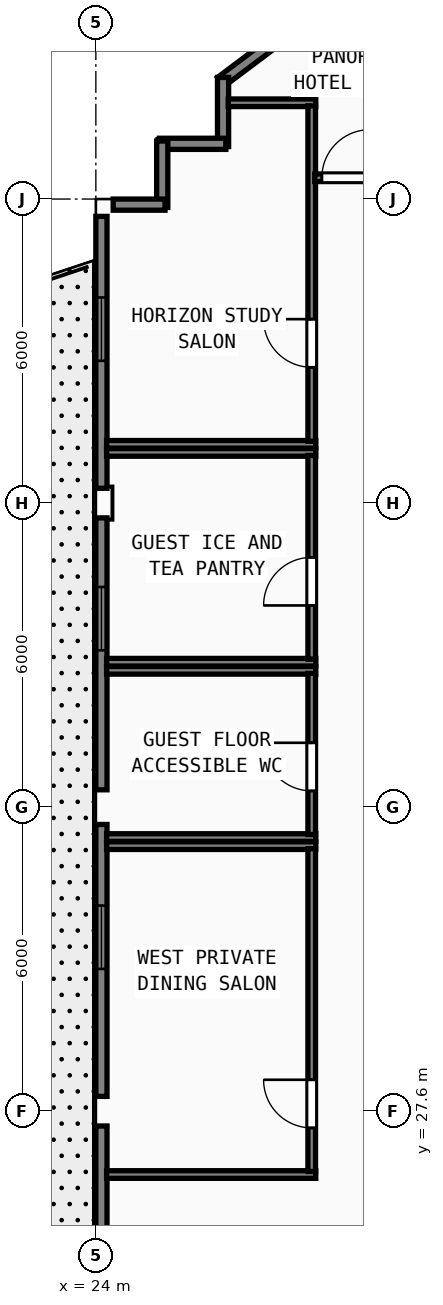
"""IFC4 building model, lengths in metres.
Left out: names, types, materials, properties, quantities, classifications, styles, units other than length and angle.
Written with IfcOpenShell. Run it as: python <this file> out.ifc"""

import sys

from ifc_helpers import new_model, si_unit, direction, frame, frame_2d, origin, origin_2d, place, context, subcontext, project, spatial, rectangle, hollow_rectangle, extrude, element, fill, save


model = new_model("IFC4")
c1 = context("Model", 3, precision=1e-05, world=origin(), true_north=direction((0.0, 1.0)))
c2 = subcontext(c1, "Body", "Model", "MODEL_VIEW")
j1 = project(units=[si_unit("LENGTHUNIT", "METRE"), si_unit("PLANEANGLEUNIT", "RADIAN")], contexts=[c1])
p1 = place(None, origin())
s1 = spatial("IfcSite", under=j1, at=p1, CompositionType="ELEMENT")
p2 = place(p1, origin())
s2 = spatial("IfcBuilding", under=s1, at=p2, CompositionType="ELEMENT")
p3 = place(p2, frame((0.0, 0.0, 282.2)))
s3 = spatial("IfcBuildingStorey", under=s2, at=p3, CompositionType="ELEMENT", Elevation=282.2)
for number, where, z_axis, x_axis in (
    (1, (24.0, 33.6, 0.0), (0.0, 0.0, 1.0), (1.0, 0.0, 0.0)),
    (2, (24.0, 45.6, 0.0), (0.0, 0.0, 1.0), (1.0, 0.0, 0.0)),
):
    element("IfcColumn", number, at=place(p3, frame(where, z_axis=z_axis, x_axis=x_axis)), inside=s3, PredefinedType="COLUMN", context=c2, shape_type="SweptSolid", body=[
        extrude(hollow_rectangle(XDim=0.7, YDim=0.7, WallThickness=0.026, at=origin_2d()), origin(), (0.0, 0.0, 1.0), 3.9),
    ])
for number, where, z_axis, x_axis in (
    (3, (24.0, 27.6, 0.0), (0.0, 0.0, 1.0), (1.0, 0.0, 0.0)),
    (4, (24.0, 39.6, 0.0), (0.0, 0.0, 1.0), (1.0, 0.0, 0.0)),
):
    element("IfcColumn", number, at=place(p3, frame(where, z_axis=z_axis, x_axis=x_axis)), inside=s3, PredefinedType="COLUMN", context=c2, shape_type="SweptSolid", body=[
        extrude(hollow_rectangle(XDim=0.6, YDim=0.6, WallThickness=0.024, at=origin_2d()), origin(), (0.0, 0.0, 1.0), 3.9),
    ])
p4 = place(p3, frame((31.289, 51.529, 0.0), z_axis=(0.0, 0.0, 1.0), x_axis=(-0.800014580093, -0.599980559383, 0.0)))
e5 = element("IfcWall", 5, at=p4, inside=s3, PredefinedType="SOLIDWALL", context=c2, shape_type="SweptSolid", body=[
    extrude(rectangle(XDim=6.028, YDim=0.22, at=frame_2d((3.014, 0.0))), origin(), (0.0, 0.0, 1.0), 3.72),
])
p5 = place(p4, frame((1.6, 0.0, 0.85)))
e6 = element("IfcOpeningElement", 6, at=p5, cuts=e5, PredefinedType="OPENING", context=c2, shape_type="SweptSolid", body=[
    extrude(rectangle(XDim=1.25, YDim=1.95, at=frame_2d((0.625, 0.975))), frame((0.0, 0.12, 0.0), z_axis=(0.0, -1.0, 0.0), x_axis=(1.0, 0.0, 0.0)), (0.0, 0.0, 1.0), 0.24),
])
p6 = place(p3, frame((26.51, 48.0, 0.0), z_axis=(0.0, 0.0, 1.0), x_axis=(0.0, -1.0, 0.0)))
e7 = element("IfcWall", 7, at=p6, inside=s3, PredefinedType="SOLIDWALL", context=c2, shape_type="SweptSolid", body=[
    extrude(rectangle(XDim=1.365, YDim=0.22, at=frame_2d((0.683, 0.0))), origin(), (0.0, 0.0, 1.0), 3.72),
])
for number, where, z_axis, x_axis in (
    (8, (26.565, 46.69, 0.0), (0.0, 0.0, 1.0), (-1.0, 0.0, 0.0)),
    (9, (25.31, 46.745, 0.0), (0.0, 0.0, 1.0), (0.0, -1.0, 0.0)),
):
    element("IfcWall", number, at=place(p3, frame(where, z_axis=z_axis, x_axis=x_axis)), inside=s3, PredefinedType="SOLIDWALL", context=c2, shape_type="SweptSolid", body=[
        extrude(rectangle(XDim=1.31, YDim=0.22, at=frame_2d((0.655, 0.0))), origin(), (0.0, 0.0, 1.0), 3.72),
    ])
p7 = place(p3, frame((25.365, 45.49, 0.0), z_axis=(0.0, 0.0, 1.0), x_axis=(-1.0, 0.0, 0.0)))
e10 = element("IfcWall", 10, at=p7, inside=s3, PredefinedType="SOLIDWALL", context=c2, shape_type="SweptSolid", body=[
    extrude(rectangle(XDim=1.023, YDim=0.22, at=frame_2d((0.511, 0.0))), origin(), (0.0, 0.0, 1.0), 3.72),
])
p8 = place(p3, frame((24.11, 45.258, 0.0), z_axis=(0.0, 0.0, 1.0), x_axis=(0.0, -1.0, 0.0)))
e11 = element("IfcWall", 11, at=p8, inside=s3, PredefinedType="SOLIDWALL", context=c2, shape_type="SweptSolid", body=[
    extrude(rectangle(XDim=5.366, YDim=0.22, at=frame_2d((2.683, 0.0))), origin(), (0.0, 0.0, 1.0), 3.365),
])
p9 = place(p8, frame((1.6, 0.0, 0.85)))
e12 = element("IfcOpeningElement", 12, at=p9, cuts=e11, PredefinedType="OPENING", context=c2, shape_type="SweptSolid", body=[
    extrude(rectangle(XDim=1.25, YDim=1.95, at=frame_2d((0.625, 0.975))), frame((0.0, 0.12, 0.0), z_axis=(0.0, -1.0, 0.0), x_axis=(1.0, 0.0, 0.0)), (0.0, 0.0, 1.0), 0.24),
])
p10 = place(p3, frame((24.11, 39.308, 0.0), z_axis=(0.0, 0.0, 1.0), x_axis=(0.0, -1.0, 0.0)))
e13 = element("IfcWall", 13, at=p10, inside=s3, PredefinedType="SOLIDWALL", context=c2, shape_type="SweptSolid", body=[
    extrude(rectangle(XDim=5.366, YDim=0.22, at=frame_2d((2.683, 0.0))), origin(), (0.0, 0.0, 1.0), 3.365),
])
p11 = place(p10, frame((1.363, 0.0, 0.85)))
e14 = element("IfcOpeningElement", 14, at=p11, cuts=e13, PredefinedType="OPENING", context=c2, shape_type="SweptSolid", body=[
    extrude(rectangle(XDim=1.25, YDim=1.95, at=frame_2d((0.625, 0.975))), frame((0.0, 0.12, 0.0), z_axis=(0.0, -1.0, 0.0), x_axis=(1.0, 0.0, 0.0)), (0.0, 0.0, 1.0), 0.24),
])
p12 = place(p3, frame((24.11, 33.258, 0.0), z_axis=(0.0, 0.0, 1.0), x_axis=(0.0, -1.0, 0.0)))
e15 = element("IfcWall", 15, at=p12, inside=s3, PredefinedType="SOLIDWALL", context=c2, shape_type="SweptSolid", body=[
    extrude(rectangle(XDim=5.366, YDim=0.22, at=frame_2d((2.683, 0.0))), origin(), (0.0, 0.0, 1.0), 3.365),
])
p13 = place(p12, frame((1.6, 0.0, 0.85)))
e16 = element("IfcOpeningElement", 16, at=p13, cuts=e15, PredefinedType="OPENING", context=c2, shape_type="SweptSolid", body=[
    extrude(rectangle(XDim=1.25, YDim=1.95, at=frame_2d((0.625, 0.975))), frame((0.0, 0.12, 0.0), z_axis=(0.0, -1.0, 0.0), x_axis=(1.0, 0.0, 0.0)), (0.0, 0.0, 1.0), 0.24),
])
p14 = place(p3, frame((24.11, 27.308, 0.0), z_axis=(0.0, 0.0, 1.0), x_axis=(0.0, -1.0, 0.0)))
e17 = element("IfcWall", 17, at=p14, inside=s3, PredefinedType="SOLIDWALL", context=c2, shape_type="SweptSolid", body=[
    extrude(rectangle(XDim=5.366, YDim=0.22, at=frame_2d((2.683, 0.0))), origin(), (0.0, 0.0, 1.0), 3.365),
])
p15 = place(p14, frame((5.146, 0.0, 0.0), z_axis=(0.0, 0.0, 1.0), x_axis=(-1.0, 0.0, 0.0)))
e18 = element("IfcOpeningElement", 18, at=p15, cuts=e17, PredefinedType="OPENING", context=c2, shape_type="SweptSolid", body=[
    extrude(rectangle(XDim=1.5, YDim=2.2, at=frame_2d((0.75, 1.1))), frame((0.0, 0.12, 0.0), z_axis=(0.0, -1.0, 0.0), x_axis=(1.0, 0.0, 0.0)), (0.0, 0.0, 1.0), 0.24),
])
for number, where, z_axis, x_axis in (
    (19, (24.212, 36.3, 0.0), (0.0, 0.0, 1.0), (1.0, 0.0, 0.0)),
    (20, (24.212, 33.0, 0.0), (0.0, 0.0, 1.0), (1.0, 0.0, 0.0)),
):
    element("IfcWall", number, at=place(p3, frame(where, z_axis=z_axis, x_axis=x_axis)), inside=s3, PredefinedType="PARTITIONING", context=c2, shape_type="SweptSolid", body=[
        extrude(rectangle(XDim=4.128, YDim=0.15, at=frame_2d((2.064, 0.0))), origin(), (0.0, 0.0, 1.0), 3.72),
    ])
p16 = place(p3, frame((28.26, 33.06, 0.0), z_axis=(0.0, 0.0, 1.0), x_axis=(0.0, 1.0, 0.0)))
e21 = element("IfcWall", 21, at=p16, inside=s3, PredefinedType="PARTITIONING", context=c2, shape_type="SweptSolid", body=[
    extrude(rectangle(XDim=3.18, YDim=0.15, at=frame_2d((1.59, 0.0))), origin(), (0.0, 0.0, 1.0), 3.72),
])
p17 = place(p16, frame((1.81, 0.0, 0.0), z_axis=(0.0, 0.0, 1.0), x_axis=(-1.0, 0.0, 0.0)))
e22 = element("IfcOpeningElement", 22, at=p17, cuts=e21, PredefinedType="OPENING", context=c2, shape_type="SweptSolid", body=[
    extrude(rectangle(XDim=0.95, YDim=2.12, at=frame_2d((0.475, 1.06))), frame((0.0, 0.085, 0.0), z_axis=(0.0, -1.0, 0.0), x_axis=(1.0, 0.0, 0.0)), (0.0, 0.0, 1.0), 0.17),
])
for number, where, z_axis, x_axis in (
    (23, (24.212, 40.6, 0.0), (0.0, 0.0, 1.0), (1.0, 0.0, 0.0)),
    (24, (24.212, 36.46, 0.0), (0.0, 0.0, 1.0), (1.0, 0.0, 0.0)),
):
    element("IfcWall", number, at=place(p3, frame(where, z_axis=z_axis, x_axis=x_axis)), inside=s3, PredefinedType="PARTITIONING", context=c2, shape_type="SweptSolid", body=[
        extrude(rectangle(XDim=4.128, YDim=0.15, at=frame_2d((2.064, 0.0))), origin(), (0.0, 0.0, 1.0), 3.72),
    ])
p18 = place(p3, frame((28.26, 36.52, 0.0), z_axis=(0.0, 0.0, 1.0), x_axis=(0.0, 1.0, 0.0)))
e25 = element("IfcWall", 25, at=p18, inside=s3, PredefinedType="PARTITIONING", context=c2, shape_type="SweptSolid", body=[
    extrude(rectangle(XDim=4.02, YDim=0.15, at=frame_2d((2.01, 0.0))), origin(), (0.0, 0.0, 1.0), 3.72),
])
p19 = place(p18, frame((2.01, 0.0, 0.0), z_axis=(0.0, 0.0, 1.0), x_axis=(-1.0, 0.0, 0.0)))
e26 = element("IfcOpeningElement", 26, at=p19, cuts=e25, PredefinedType="OPENING", context=c2, shape_type="SweptSolid", body=[
    extrude(rectangle(XDim=0.95, YDim=2.12, at=frame_2d((0.475, 1.06))), frame((0.0, 0.085, 0.0), z_axis=(0.0, -1.0, 0.0), x_axis=(1.0, 0.0, 0.0)), (0.0, 0.0, 1.0), 0.17),
])
p20 = place(p3, frame((26.612, 47.5, 0.0), z_axis=(0.0, 0.0, 1.0), x_axis=(1.0, 0.0, 0.0)))
e27 = element("IfcWall", 27, at=p20, inside=s3, PredefinedType="PARTITIONING", context=c2, shape_type="SweptSolid", body=[
    extrude(rectangle(XDim=1.728, YDim=0.15, at=frame_2d((0.864, 0.0))), origin(), (0.0, 0.0, 1.0), 3.72),
])
p21 = place(p3, frame((24.212, 40.76, 0.0), z_axis=(0.0, 0.0, 1.0), x_axis=(1.0, 0.0, 0.0)))
e28 = element("IfcWall", 28, at=p21, inside=s3, PredefinedType="PARTITIONING", context=c2, shape_type="SweptSolid", body=[
    extrude(rectangle(XDim=4.128, YDim=0.15, at=frame_2d((2.064, 0.0))), origin(), (0.0, 0.0, 1.0), 3.72),
])
p22 = place(p3, frame((28.26, 40.82, 0.0), z_axis=(0.0, 0.0, 1.0), x_axis=(0.0, 1.0, 0.0)))
e29 = element("IfcWall", 29, at=p22, inside=s3, PredefinedType="PARTITIONING", context=c2, shape_type="SweptSolid", body=[
    extrude(rectangle(XDim=6.62, YDim=0.15, at=frame_2d((3.31, 0.0))), origin(), (0.0, 0.0, 1.0), 3.72),
])
p23 = place(p22, frame((2.41, 0.0, 0.0), z_axis=(0.0, 0.0, 1.0), x_axis=(-1.0, 0.0, 0.0)))
e30 = element("IfcOpeningElement", 30, at=p23, cuts=e29, PredefinedType="OPENING", context=c2, shape_type="SweptSolid", body=[
    extrude(rectangle(XDim=0.95, YDim=2.12, at=frame_2d((0.475, 1.06))), frame((0.0, 0.085, 0.0), z_axis=(0.0, -1.0, 0.0), x_axis=(1.0, 0.0, 0.0)), (0.0, 0.0, 1.0), 0.17),
])
for number, where, z_axis, x_axis in (
    (31, (24.212, 32.84, 0.0), (0.0, 0.0, 1.0), (1.0, 0.0, 0.0)),
    (32, (24.212, 26.35, 0.0), (0.0, 0.0, 1.0), (1.0, 0.0, 0.0)),
):
    element("IfcWall", number, at=place(p3, frame(where, z_axis=z_axis, x_axis=x_axis)), inside=s3, PredefinedType="PARTITIONING", context=c2, shape_type="SweptSolid", body=[
        extrude(rectangle(XDim=4.128, YDim=0.15, at=frame_2d((2.064, 0.0))), origin(), (0.0, 0.0, 1.0), 3.72),
    ])
p24 = place(p3, frame((28.26, 26.41, 0.0), z_axis=(0.0, 0.0, 1.0), x_axis=(0.0, 1.0, 0.0)))
e33 = element("IfcWall", 33, at=p24, inside=s3, PredefinedType="PARTITIONING", context=c2, shape_type="SweptSolid", body=[
    extrude(rectangle(XDim=6.37, YDim=0.15, at=frame_2d((3.185, 0.0))), origin(), (0.0, 0.0, 1.0), 3.72),
])
p25 = place(p24, frame((1.81, 0.0, 0.0), z_axis=(0.0, 0.0, 1.0), x_axis=(-1.0, 0.0, 0.0)))
e34 = element("IfcOpeningElement", 34, at=p25, cuts=e33, PredefinedType="OPENING", context=c2, shape_type="SweptSolid", body=[
    extrude(rectangle(XDim=0.95, YDim=2.12, at=frame_2d((0.475, 1.06))), frame((0.0, 0.085, 0.0), z_axis=(0.0, -1.0, 0.0), x_axis=(1.0, 0.0, 0.0)), (0.0, 0.0, 1.0), 0.17),
])
p26 = place(p3, frame((28.32, 46.02, 0.0), z_axis=(0.0, 0.0, 1.0), x_axis=(1.0, 0.0, 0.0)))
e35 = element("IfcWall", 35, at=p26, inside=s3, PredefinedType="PARTITIONING", context=c2, shape_type="SweptSolid", body=[
    extrude(rectangle(XDim=3.095, YDim=0.15, at=frame_2d((1.547, 0.0))), origin(), (0.0, 0.0, 1.0), 3.72),
])
p27 = place(p26, frame((0.14, 0.0, 0.0)))
e36 = element("IfcOpeningElement", 36, at=p27, cuts=e35, PredefinedType="OPENING", context=c2, shape_type="SweptSolid", body=[
    extrude(rectangle(XDim=0.95, YDim=2.15, at=frame_2d((0.475, 1.075))), frame((0.0, 0.085, 0.0), z_axis=(0.0, -1.0, 0.0), x_axis=(1.0, 0.0, 0.0)), (0.0, 0.0, 1.0), 0.17),
])
p28 = place(p9, origin())
e37 = element("IfcWindow", 37, at=p28, inside=s3, PartitioningType="SINGLE_PANEL", PredefinedType="WINDOW", context=c2, shape_type="SweptSolid", body=[
    extrude(rectangle(XDim=1.25, YDim=1.95, at=frame_2d((0.625, 0.975))), frame((0.0, 0.03, 0.0), z_axis=(0.0, -1.0, 0.0), x_axis=(1.0, 0.0, 0.0)), (0.0, 0.0, 1.0), 0.06),
])
fill(e12, e37)
p29 = place(p11, origin())
e38 = element("IfcWindow", 38, at=p29, inside=s3, PartitioningType="SINGLE_PANEL", PredefinedType="WINDOW", context=c2, shape_type="SweptSolid", body=[
    extrude(rectangle(XDim=1.25, YDim=1.95, at=frame_2d((0.625, 0.975))), frame((0.0, 0.03, 0.0), z_axis=(0.0, -1.0, 0.0), x_axis=(1.0, 0.0, 0.0)), (0.0, 0.0, 1.0), 0.06),
])
fill(e14, e38)
p30 = place(p13, origin())
e39 = element("IfcWindow", 39, at=p30, inside=s3, PartitioningType="SINGLE_PANEL", PredefinedType="WINDOW", context=c2, shape_type="SweptSolid", body=[
    extrude(rectangle(XDim=1.25, YDim=1.95, at=frame_2d((0.625, 0.975))), frame((0.0, 0.03, 0.0), z_axis=(0.0, -1.0, 0.0), x_axis=(1.0, 0.0, 0.0)), (0.0, 0.0, 1.0), 0.06),
])
fill(e16, e39)
p31 = place(p17, origin())
e40 = element("IfcDoor", 40, at=p31, inside=s3, OperationType="SINGLE_SWING_LEFT", PredefinedType="DOOR", context=c2, shape_type="SweptSolid", body=[
    extrude(rectangle(XDim=0.95, YDim=2.12, at=frame_2d((0.475, 1.06))), frame((0.0, 0.025, 0.0), z_axis=(0.0, -1.0, 0.0), x_axis=(1.0, 0.0, 0.0)), (0.0, 0.0, 1.0), 0.05),
])
fill(e22, e40)
p32 = place(p19, origin())
e41 = element("IfcDoor", 41, at=p32, inside=s3, OperationType="SINGLE_SWING_RIGHT", PredefinedType="DOOR", context=c2, shape_type="SweptSolid", body=[
    extrude(rectangle(XDim=0.95, YDim=2.12, at=frame_2d((0.475, 1.06))), frame((0.0, 0.025, 0.0), z_axis=(0.0, -1.0, 0.0), x_axis=(1.0, 0.0, 0.0)), (0.0, 0.0, 1.0), 0.05),
])
fill(e26, e41)
p33 = place(p23, origin())
e42 = element("IfcDoor", 42, at=p33, inside=s3, OperationType="SINGLE_SWING_LEFT", PredefinedType="DOOR", context=c2, shape_type="SweptSolid", body=[
    extrude(rectangle(XDim=0.95, YDim=2.12, at=frame_2d((0.475, 1.06))), frame((0.0, 0.025, 0.0), z_axis=(0.0, -1.0, 0.0), x_axis=(1.0, 0.0, 0.0)), (0.0, 0.0, 1.0), 0.05),
])
fill(e30, e42)
p34 = place(p25, origin())
e43 = element("IfcDoor", 43, at=p34, inside=s3, OperationType="SINGLE_SWING_LEFT", PredefinedType="DOOR", context=c2, shape_type="SweptSolid", body=[
    extrude(rectangle(XDim=0.95, YDim=2.12, at=frame_2d((0.475, 1.06))), frame((0.0, 0.025, 0.0), z_axis=(0.0, -1.0, 0.0), x_axis=(1.0, 0.0, 0.0)), (0.0, 0.0, 1.0), 0.05),
])
fill(e34, e43)
p35 = place(p27, origin())
e44 = element("IfcDoor", 44, at=p35, inside=s3, OperationType="SINGLE_SWING_RIGHT", PredefinedType="DOOR", context=c2, shape_type="SweptSolid", body=[
    extrude(rectangle(XDim=0.95, YDim=2.15, at=frame_2d((0.475, 1.075))), frame((0.0, 0.025, 0.0), z_axis=(0.0, -1.0, 0.0), x_axis=(1.0, 0.0, 0.0)), (0.0, 0.0, 1.0), 0.05),
])
fill(e36, e44)
save(model, sys.argv[1])
